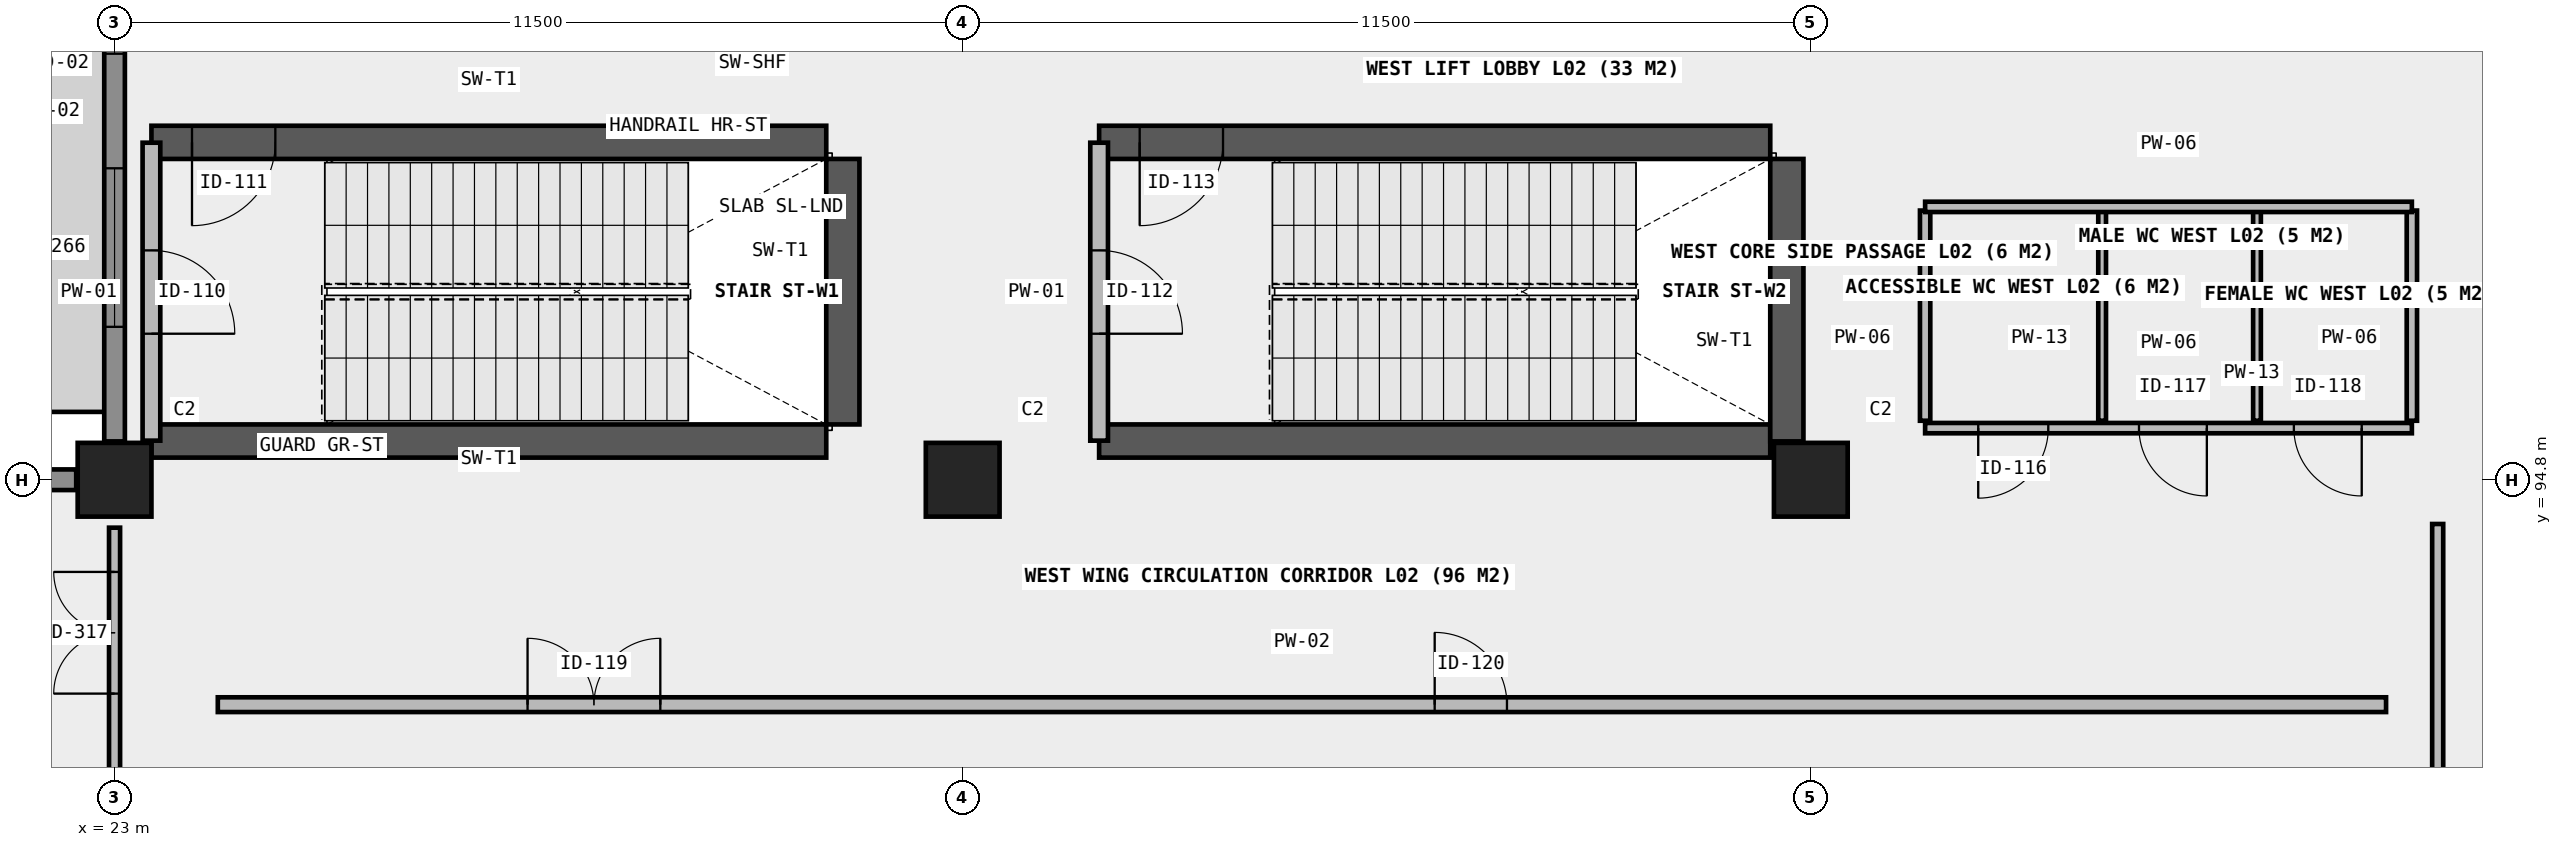
"""IFC4 building model, lengths in metres.
Left out: names, types, materials, properties, quantities, classifications, styles, units other than length and angle.
Written with IfcOpenShell. Run it as: python <this file> out.ifc"""

import sys

from ifc_helpers import new_model, si_unit, direction, frame, frame_2d, origin, origin_2d, place, context, subcontext, project, spatial, rectangle, extrude, element, fill, save


model = new_model("IFC4")
c1 = context("Model", 3, precision=1e-05, world=origin(), true_north=direction((0.0, 1.0)))
c2 = subcontext(c1, "Body", "Model", "MODEL_VIEW")
j1 = project(units=[si_unit("LENGTHUNIT", "METRE"), si_unit("PLANEANGLEUNIT", "RADIAN")], contexts=[c1])
p1 = place(None, origin())
s1 = spatial("IfcSite", under=j1, at=p1, CompositionType="ELEMENT")
p2 = place(p1, origin())
s2 = spatial("IfcBuilding", under=s1, at=p2, CompositionType="ELEMENT")
p3 = place(p2, frame((0.0, 0.0, 8.4)))
s3 = spatial("IfcBuildingStorey", under=s2, at=p3, CompositionType="ELEMENT", Elevation=8.4)
for number, where, z_axis, x_axis in (
    (1, (23.0, 94.8, 0.0), (0.0, 0.0, 1.0), (1.0, 0.0, 0.0)),
    (2, (34.5, 94.8, 0.0), (0.0, 0.0, 1.0), (1.0, 0.0, 0.0)),
    (3, (46.0, 94.8, 0.0), (0.0, 0.0, 1.0), (1.0, 0.0, 0.0)),
):
    element("IfcColumn", number, at=place(p3, frame(where, z_axis=z_axis, x_axis=x_axis)), inside=s3, PredefinedType="COLUMN", context=c2, shape_type="SweptSolid", body=[
        extrude(rectangle(XDim=1.0, YDim=1.0, at=origin_2d()), origin(), (0.0, 0.0, 1.0), 5.4),
    ])
p4 = place(p3, frame((23.5, 95.325, 0.0), z_axis=(0.0, 0.0, 1.0), x_axis=(1.0, 0.0, 0.0)))
e4 = element("IfcWall", 4, at=p4, inside=s3, PredefinedType="SHEAR", context=c2, shape_type="SweptSolid", body=[
    extrude(rectangle(XDim=9.15, YDim=0.45, at=frame_2d((4.575, 0.0))), origin(), (0.0, 0.0, 1.0), 5.4),
])
p5 = place(p3, frame((23.5, 99.375, 0.0), z_axis=(0.0, 0.0, 1.0), x_axis=(1.0, 0.0, 0.0)))
e5 = element("IfcWall", 5, at=p5, inside=s3, PredefinedType="SHEAR", context=c2, shape_type="SweptSolid", body=[
    extrude(rectangle(XDim=9.15, YDim=0.45, at=frame_2d((4.575, 0.0))), origin(), (0.0, 0.0, 1.0), 5.4),
])
p6 = place(p5, frame((0.55, 0.0, 0.0)))
e6 = element("IfcOpeningElement", 6, at=p6, cuts=e5, PredefinedType="OPENING", context=c2, shape_type="SweptSolid", body=[
    extrude(rectangle(XDim=1.13, YDim=2.15, at=frame_2d((0.565, 1.075))), frame((0.0, 0.235, 0.0), z_axis=(0.0, -1.0, 0.0), x_axis=(1.0, 0.0, 0.0)), (0.0, 0.0, 1.0), 0.47),
])
p7 = place(p3, frame((32.875, 95.55, 0.0), z_axis=(0.0, 0.0, 1.0), x_axis=(0.0, 1.0, 0.0)))
e7 = element("IfcWall", 7, at=p7, inside=s3, PredefinedType="SHEAR", context=c2, shape_type="SweptSolid", body=[
    extrude(rectangle(XDim=3.6, YDim=0.45, at=frame_2d((1.8, 0.0))), origin(), (0.0, 0.0, 1.0), 5.4),
])
p8 = place(p3, frame((36.35, 95.325, 0.0), z_axis=(0.0, 0.0, 1.0), x_axis=(1.0, 0.0, 0.0)))
e8 = element("IfcWall", 8, at=p8, inside=s3, PredefinedType="SHEAR", context=c2, shape_type="SweptSolid", body=[
    extrude(rectangle(XDim=9.1, YDim=0.45, at=frame_2d((4.55, 0.0))), origin(), (0.0, 0.0, 1.0), 5.4),
])
p9 = place(p3, frame((36.35, 99.375, 0.0), z_axis=(0.0, 0.0, 1.0), x_axis=(1.0, 0.0, 0.0)))
e9 = element("IfcWall", 9, at=p9, inside=s3, PredefinedType="SHEAR", context=c2, shape_type="SweptSolid", body=[
    extrude(rectangle(XDim=9.1, YDim=0.45, at=frame_2d((4.55, 0.0))), origin(), (0.0, 0.0, 1.0), 5.4),
])
p10 = place(p9, frame((0.55, 0.0, 0.0)))
e10 = element("IfcOpeningElement", 10, at=p10, cuts=e9, PredefinedType="OPENING", context=c2, shape_type="SweptSolid", body=[
    extrude(rectangle(XDim=1.13, YDim=2.15, at=frame_2d((0.565, 1.075))), frame((0.0, 0.235, 0.0), z_axis=(0.0, -1.0, 0.0), x_axis=(1.0, 0.0, 0.0)), (0.0, 0.0, 1.0), 0.47),
])
p11 = place(p3, frame((45.675, 95.32, 0.0), z_axis=(0.0, 0.0, 1.0), x_axis=(0.0, 1.0, 0.0)))
e11 = element("IfcWall", 11, at=p11, inside=s3, PredefinedType="SHEAR", context=c2, shape_type="SweptSolid", body=[
    extrude(rectangle(XDim=3.83, YDim=0.45, at=frame_2d((1.915, 0.0))), origin(), (0.0, 0.0, 1.0), 5.4),
])
p12 = place(p3, frame((23.0, 95.32, 0.0), z_axis=(0.0, 0.0, 1.0), x_axis=(0.0, 1.0, 0.0)))
e12 = element("IfcWall", 12, at=p12, inside=s3, PredefinedType="SOLIDWALL", context=c2, shape_type="SweptSolid", body=[
    extrude(rectangle(XDim=8.96, YDim=0.28, at=frame_2d((4.48, 0.0))), origin(), (0.0, 0.0, 1.0), 4.35),
])
p13 = place(p12, frame((1.553, 0.0, 0.85)))
e13 = element("IfcOpeningElement", 13, at=p13, cuts=e12, PredefinedType="OPENING", context=c2, shape_type="SweptSolid", body=[
    extrude(rectangle(XDim=2.15, YDim=1.95, at=frame_2d((1.075, 0.975))), frame((0.0, 0.15, 0.0), z_axis=(0.0, -1.0, 0.0), x_axis=(1.0, 0.0, 0.0)), (0.0, 0.0, 1.0), 0.3),
])
p14 = place(p12, frame((5.257, 0.0, 0.85)))
e14 = element("IfcOpeningElement", 14, at=p14, cuts=e12, PredefinedType="OPENING", context=c2, shape_type="SweptSolid", body=[
    extrude(rectangle(XDim=2.15, YDim=1.95, at=frame_2d((1.075, 0.975))), frame((0.0, 0.15, 0.0), z_axis=(0.0, -1.0, 0.0), x_axis=(1.0, 0.0, 0.0)), (0.0, 0.0, 1.0), 0.3),
])
p15 = place(p3, frame((12.02, 94.8, 0.0), z_axis=(0.0, 0.0, 1.0), x_axis=(1.0, 0.0, 0.0)))
e15 = element("IfcWall", 15, at=p15, inside=s3, PredefinedType="SOLIDWALL", context=c2, shape_type="SweptSolid", body=[
    extrude(rectangle(XDim=10.46, YDim=0.28, at=frame_2d((5.23, 0.0))), origin(), (0.0, 0.0, 1.0), 4.35),
])
p16 = place(p15, frame((1.002, 0.0, 0.85)))
e16 = element("IfcOpeningElement", 16, at=p16, cuts=e15, PredefinedType="OPENING", context=c2, shape_type="SweptSolid", body=[
    extrude(rectangle(XDim=2.15, YDim=1.95, at=frame_2d((1.075, 0.975))), frame((0.0, 0.15, 0.0), z_axis=(0.0, -1.0, 0.0), x_axis=(1.0, 0.0, 0.0)), (0.0, 0.0, 1.0), 0.3),
])
p17 = place(p15, frame((4.155, 0.0, 0.85)))
e17 = element("IfcOpeningElement", 17, at=p17, cuts=e15, PredefinedType="OPENING", context=c2, shape_type="SweptSolid", body=[
    extrude(rectangle(XDim=2.15, YDim=1.95, at=frame_2d((1.075, 0.975))), frame((0.0, 0.15, 0.0), z_axis=(0.0, -1.0, 0.0), x_axis=(1.0, 0.0, 0.0)), (0.0, 0.0, 1.0), 0.3),
])
p18 = place(p15, frame((7.308, 0.0, 0.85)))
e18 = element("IfcOpeningElement", 18, at=p18, cuts=e15, PredefinedType="OPENING", context=c2, shape_type="SweptSolid", body=[
    extrude(rectangle(XDim=2.15, YDim=1.95, at=frame_2d((1.075, 0.975))), frame((0.0, 0.15, 0.0), z_axis=(0.0, -1.0, 0.0), x_axis=(1.0, 0.0, 0.0)), (0.0, 0.0, 1.0), 0.3),
])
p19 = place(p3, frame((23.5, 95.33, 0.0), z_axis=(0.0, 0.0, 1.0), x_axis=(0.0, 1.0, 0.0)))
e19 = element("IfcWall", 19, at=p19, inside=s3, PredefinedType="SOLIDWALL", context=c2, shape_type="SweptSolid", body=[
    extrude(rectangle(XDim=4.04, YDim=0.24, at=frame_2d((2.02, 0.0))), origin(), (0.0, 0.0, 1.0), 5.12),
])
p20 = place(p19, frame((1.45, 0.0, 0.0)))
e20 = element("IfcOpeningElement", 20, at=p20, cuts=e19, PredefinedType="OPENING", context=c2, shape_type="SweptSolid", body=[
    extrude(rectangle(XDim=1.13, YDim=2.15, at=frame_2d((0.565, 1.075))), frame((0.0, 0.13, 0.0), z_axis=(0.0, -1.0, 0.0), x_axis=(1.0, 0.0, 0.0)), (0.0, 0.0, 1.0), 0.26),
])
p21 = place(p3, frame((36.35, 95.33, 0.0), z_axis=(0.0, 0.0, 1.0), x_axis=(0.0, 1.0, 0.0)))
e21 = element("IfcWall", 21, at=p21, inside=s3, PredefinedType="SOLIDWALL", context=c2, shape_type="SweptSolid", body=[
    extrude(rectangle(XDim=4.04, YDim=0.24, at=frame_2d((2.02, 0.0))), origin(), (0.0, 0.0, 1.0), 5.12),
])
p22 = place(p21, frame((1.45, 0.0, 0.0)))
e22 = element("IfcOpeningElement", 22, at=p22, cuts=e21, PredefinedType="OPENING", context=c2, shape_type="SweptSolid", body=[
    extrude(rectangle(XDim=1.13, YDim=2.15, at=frame_2d((0.565, 1.075))), frame((0.0, 0.13, 0.0), z_axis=(0.0, -1.0, 0.0), x_axis=(1.0, 0.0, 0.0)), (0.0, 0.0, 1.0), 0.26),
])
p23 = place(p3, frame((47.55, 95.5, 0.0), z_axis=(0.0, 0.0, 1.0), x_axis=(1.0, 0.0, 0.0)))
e23 = element("IfcWall", 23, at=p23, inside=s3, PredefinedType="PLUMBINGWALL", context=c2, shape_type="SweptSolid", body=[
    extrude(rectangle(XDim=6.6, YDim=0.14, at=frame_2d((3.3, 0.0))), origin(), (0.0, 0.0, 1.0), 5.12),
])
p24 = place(p23, frame((0.72, 0.0, 0.0)))
e24 = element("IfcOpeningElement", 24, at=p24, cuts=e23, PredefinedType="OPENING", context=c2, shape_type="SweptSolid", body=[
    extrude(rectangle(XDim=0.95, YDim=2.1, at=frame_2d((0.475, 1.05))), frame((0.0, 0.08, 0.0), z_axis=(0.0, -1.0, 0.0), x_axis=(1.0, 0.0, 0.0)), (0.0, 0.0, 1.0), 0.16),
])
p25 = place(p23, frame((2.9, 0.0, 0.0)))
e25 = element("IfcOpeningElement", 25, at=p25, cuts=e23, PredefinedType="OPENING", context=c2, shape_type="SweptSolid", body=[
    extrude(rectangle(XDim=0.92, YDim=2.1, at=frame_2d((0.46, 1.05))), frame((0.0, 0.08, 0.0), z_axis=(0.0, -1.0, 0.0), x_axis=(1.0, 0.0, 0.0)), (0.0, 0.0, 1.0), 0.16),
])
p26 = place(p23, frame((5.0, 0.0, 0.0)))
e26 = element("IfcOpeningElement", 26, at=p26, cuts=e23, PredefinedType="OPENING", context=c2, shape_type="SweptSolid", body=[
    extrude(rectangle(XDim=0.92, YDim=2.1, at=frame_2d((0.46, 1.05))), frame((0.0, 0.08, 0.0), z_axis=(0.0, -1.0, 0.0), x_axis=(1.0, 0.0, 0.0)), (0.0, 0.0, 1.0), 0.16),
])
p27 = place(p3, frame((47.55, 95.6, 0.0), z_axis=(0.0, 0.0, 1.0), x_axis=(0.0, 1.0, 0.0)))
e27 = element("IfcWall", 27, at=p27, inside=s3, PredefinedType="PLUMBINGWALL", context=c2, shape_type="SweptSolid", body=[
    extrude(rectangle(XDim=2.85, YDim=0.14, at=frame_2d((1.425, 0.0))), origin(), (0.0, 0.0, 1.0), 5.12),
])
p28 = place(p3, frame((49.95, 95.6, 0.0), z_axis=(0.0, 0.0, 1.0), x_axis=(0.0, 1.0, 0.0)))
e28 = element("IfcWall", 28, at=p28, inside=s3, PredefinedType="PARTITIONING", context=c2, shape_type="SweptSolid", body=[
    extrude(rectangle(XDim=2.85, YDim=0.105, at=frame_2d((1.425, 0.0))), origin(), (0.0, 0.0, 1.0), 4.6),
])
p29 = place(p3, frame((52.05, 95.6, 0.0), z_axis=(0.0, 0.0, 1.0), x_axis=(0.0, 1.0, 0.0)))
e29 = element("IfcWall", 29, at=p29, inside=s3, PredefinedType="PARTITIONING", context=c2, shape_type="SweptSolid", body=[
    extrude(rectangle(XDim=2.85, YDim=0.105, at=frame_2d((1.425, 0.0))), origin(), (0.0, 0.0, 1.0), 5.12),
])
p30 = place(p3, frame((54.15, 95.6, 0.0), z_axis=(0.0, 0.0, 1.0), x_axis=(0.0, 1.0, 0.0)))
e30 = element("IfcWall", 30, at=p30, inside=s3, PredefinedType="PLUMBINGWALL", context=c2, shape_type="SweptSolid", body=[
    extrude(rectangle(XDim=2.85, YDim=0.14, at=frame_2d((1.425, 0.0))), origin(), (0.0, 0.0, 1.0), 5.12),
])
p31 = place(p3, frame((47.55, 98.5, 0.0), z_axis=(0.0, 0.0, 1.0), x_axis=(1.0, 0.0, 0.0)))
e31 = element("IfcWall", 31, at=p31, inside=s3, PredefinedType="PLUMBINGWALL", context=c2, shape_type="SweptSolid", body=[
    extrude(rectangle(XDim=6.6, YDim=0.14, at=frame_2d((3.3, 0.0))), origin(), (0.0, 0.0, 1.0), 5.12),
])
p32 = place(p3, frame((24.4, 91.75, 0.0), z_axis=(0.0, 0.0, 1.0), x_axis=(1.0, 0.0, 0.0)))
e32 = element("IfcWall", 32, at=p32, inside=s3, PredefinedType="PARTITIONING", context=c2, shape_type="SweptSolid", body=[
    extrude(rectangle(XDim=29.4, YDim=0.2, at=frame_2d((14.7, 0.0))), origin(), (0.0, 0.0, 1.0), 5.12),
])
p33 = place(p32, frame((4.2, 0.0, 0.0)))
e33 = element("IfcOpeningElement", 33, at=p33, cuts=e32, PredefinedType="OPENING", context=c2, shape_type="SweptSolid", body=[
    extrude(rectangle(XDim=1.8, YDim=2.2, at=frame_2d((0.9, 1.1))), frame((0.0, 0.11, 0.0), z_axis=(0.0, -1.0, 0.0), x_axis=(1.0, 0.0, 0.0)), (0.0, 0.0, 1.0), 0.22),
])
p34 = place(p32, frame((16.5, 0.0, 0.0)))
e34 = element("IfcOpeningElement", 34, at=p34, cuts=e32, PredefinedType="OPENING", context=c2, shape_type="SweptSolid", body=[
    extrude(rectangle(XDim=0.98, YDim=2.15, at=frame_2d((0.49, 1.075))), frame((0.0, 0.11, 0.0), z_axis=(0.0, -1.0, 0.0), x_axis=(1.0, 0.0, 0.0)), (0.0, 0.0, 1.0), 0.22),
])
p35 = place(p3, frame((54.5, 86.4, 0.0), z_axis=(0.0, 0.0, 1.0), x_axis=(0.0, 1.0, 0.0)))
e35 = element("IfcWall", 35, at=p35, inside=s3, PredefinedType="PARTITIONING", context=c2, shape_type="SweptSolid", body=[
    extrude(rectangle(XDim=7.8, YDim=0.15, at=frame_2d((3.9, 0.0))), origin(), (0.0, 0.0, 1.0), 5.12),
])
p36 = place(p35, frame((2.8, 0.0, 0.0)))
e36 = element("IfcOpeningElement", 36, at=p36, cuts=e35, PredefinedType="OPENING", context=c2, shape_type="SweptSolid", body=[
    extrude(rectangle(XDim=1.65, YDim=2.2, at=frame_2d((0.825, 1.1))), frame((0.0, 0.085, 0.0), z_axis=(0.0, -1.0, 0.0), x_axis=(1.0, 0.0, 0.0)), (0.0, 0.0, 1.0), 0.17),
])
p37 = place(p3, frame((23.0, 86.45, 0.0), z_axis=(0.0, 0.0, 1.0), x_axis=(0.0, 1.0, 0.0)))
e37 = element("IfcWall", 37, at=p37, inside=s3, PredefinedType="PARTITIONING", context=c2, shape_type="SweptSolid", body=[
    extrude(rectangle(XDim=7.7, YDim=0.15, at=frame_2d((3.85, 0.0))), origin(), (0.0, 0.0, 1.0), 4.35),
])
p38 = place(p37, frame((5.45, 0.0, 0.0)))
e38 = element("IfcOpeningElement", 38, at=p38, cuts=e37, PredefinedType="OPENING", context=c2, shape_type="SweptSolid", body=[
    extrude(rectangle(XDim=1.65, YDim=2.2, at=frame_2d((0.825, 1.1))), frame((0.0, 0.085, 0.0), z_axis=(0.0, -1.0, 0.0), x_axis=(1.0, 0.0, 0.0)), (0.0, 0.0, 1.0), 0.17),
])
p39 = place(p13, origin())
e39 = element("IfcWindow", 39, at=p39, inside=s3, PartitioningType="SINGLE_PANEL", PredefinedType="WINDOW", context=c2, shape_type="SweptSolid", body=[
    extrude(rectangle(XDim=2.15, YDim=1.95, at=frame_2d((1.075, 0.975))), frame((0.0, 0.03, 0.0), z_axis=(0.0, -1.0, 0.0), x_axis=(1.0, 0.0, 0.0)), (0.0, 0.0, 1.0), 0.06),
])
fill(e13, e39)
p40 = place(p14, origin())
e40 = element("IfcWindow", 40, at=p40, inside=s3, PartitioningType="SINGLE_PANEL", PredefinedType="WINDOW", context=c2, shape_type="SweptSolid", body=[
    extrude(rectangle(XDim=2.15, YDim=1.95, at=frame_2d((1.075, 0.975))), frame((0.0, 0.03, 0.0), z_axis=(0.0, -1.0, 0.0), x_axis=(1.0, 0.0, 0.0)), (0.0, 0.0, 1.0), 0.06),
])
fill(e14, e40)
p41 = place(p20, frame((0.565, 0.0, 0.0), z_axis=(0.0, 0.0, 1.0), x_axis=(-1.0, 0.0, 0.0)))
e41 = element("IfcDoor", 41, at=p41, inside=s3, OperationType="SINGLE_SWING_LEFT", PredefinedType="DOOR", context=c2, shape_type="SweptSolid", body=[
    extrude(rectangle(XDim=1.13, YDim=2.15, at=frame_2d((0.0, 1.075))), frame((0.0, 0.025, 0.0), z_axis=(0.0, -1.0, 0.0), x_axis=(1.0, 0.0, 0.0)), (0.0, 0.0, 1.0), 0.05),
])
fill(e20, e41)
p42 = place(p6, frame((0.565, 0.0, 0.0), z_axis=(0.0, 0.0, 1.0), x_axis=(-1.0, 0.0, 0.0)))
e42 = element("IfcDoor", 42, at=p42, inside=s3, OperationType="SINGLE_SWING_LEFT", PredefinedType="DOOR", context=c2, shape_type="SweptSolid", body=[
    extrude(rectangle(XDim=1.13, YDim=2.15, at=frame_2d((0.0, 1.075))), frame((0.0, 0.025, 0.0), z_axis=(0.0, -1.0, 0.0), x_axis=(1.0, 0.0, 0.0)), (0.0, 0.0, 1.0), 0.05),
])
fill(e6, e42)
p43 = place(p22, frame((0.565, 0.0, 0.0), z_axis=(0.0, 0.0, 1.0), x_axis=(-1.0, 0.0, 0.0)))
e43 = element("IfcDoor", 43, at=p43, inside=s3, OperationType="SINGLE_SWING_LEFT", PredefinedType="DOOR", context=c2, shape_type="SweptSolid", body=[
    extrude(rectangle(XDim=1.13, YDim=2.15, at=frame_2d((0.0, 1.075))), frame((0.0, 0.025, 0.0), z_axis=(0.0, -1.0, 0.0), x_axis=(1.0, 0.0, 0.0)), (0.0, 0.0, 1.0), 0.05),
])
fill(e22, e43)
p44 = place(p10, frame((0.565, 0.0, 0.0), z_axis=(0.0, 0.0, 1.0), x_axis=(-1.0, 0.0, 0.0)))
e44 = element("IfcDoor", 44, at=p44, inside=s3, OperationType="SINGLE_SWING_LEFT", PredefinedType="DOOR", context=c2, shape_type="SweptSolid", body=[
    extrude(rectangle(XDim=1.13, YDim=2.15, at=frame_2d((0.0, 1.075))), frame((0.0, 0.025, 0.0), z_axis=(0.0, -1.0, 0.0), x_axis=(1.0, 0.0, 0.0)), (0.0, 0.0, 1.0), 0.05),
])
fill(e10, e44)
p45 = place(p24, frame((0.475, 0.0, 0.0), z_axis=(0.0, 0.0, 1.0), x_axis=(-1.0, 0.0, 0.0)))
e45 = element("IfcDoor", 45, at=p45, inside=s3, OperationType="SINGLE_SWING_LEFT", PredefinedType="DOOR", context=c2, shape_type="SweptSolid", body=[
    extrude(rectangle(XDim=0.95, YDim=2.1, at=frame_2d((0.0, 1.05))), frame((0.0, 0.025, 0.0), z_axis=(0.0, -1.0, 0.0), x_axis=(1.0, 0.0, 0.0)), (0.0, 0.0, 1.0), 0.05),
])
fill(e24, e45)
p46 = place(p25, origin())
e46 = element("IfcDoor", 46, at=p46, inside=s3, OperationType="SINGLE_SWING_RIGHT", PredefinedType="DOOR", context=c2, shape_type="SweptSolid", body=[
    extrude(rectangle(XDim=0.92, YDim=2.1, at=frame_2d((0.46, 1.05))), frame((0.0, 0.025, 0.0), z_axis=(0.0, -1.0, 0.0), x_axis=(1.0, 0.0, 0.0)), (0.0, 0.0, 1.0), 0.05),
])
fill(e25, e46)
p47 = place(p26, origin())
e47 = element("IfcDoor", 47, at=p47, inside=s3, OperationType="SINGLE_SWING_RIGHT", PredefinedType="DOOR", context=c2, shape_type="SweptSolid", body=[
    extrude(rectangle(XDim=0.92, YDim=2.1, at=frame_2d((0.46, 1.05))), frame((0.0, 0.025, 0.0), z_axis=(0.0, -1.0, 0.0), x_axis=(1.0, 0.0, 0.0)), (0.0, 0.0, 1.0), 0.05),
])
fill(e26, e47)
p48 = place(p33, origin())
e48 = element("IfcDoor", 48, at=p48, inside=s3, OperationType="DOUBLE_DOOR_SINGLE_SWING", PredefinedType="DOOR", context=c2, shape_type="SweptSolid", body=[
    extrude(rectangle(XDim=1.8, YDim=2.2, at=frame_2d((0.9, 1.1))), frame((0.0, 0.025, 0.0), z_axis=(0.0, -1.0, 0.0), x_axis=(1.0, 0.0, 0.0)), (0.0, 0.0, 1.0), 0.05),
])
fill(e33, e48)
p49 = place(p34, origin())
e49 = element("IfcDoor", 49, at=p49, inside=s3, OperationType="SINGLE_SWING_LEFT", PredefinedType="DOOR", context=c2, shape_type="SweptSolid", body=[
    extrude(rectangle(XDim=0.98, YDim=2.15, at=frame_2d((0.49, 1.075))), frame((0.0, 0.025, 0.0), z_axis=(0.0, -1.0, 0.0), x_axis=(1.0, 0.0, 0.0)), (0.0, 0.0, 1.0), 0.05),
])
fill(e34, e49)
p50 = place(p38, origin())
e50 = element("IfcDoor", 50, at=p50, inside=s3, OperationType="DOUBLE_DOOR_SINGLE_SWING", PredefinedType="DOOR", context=c2, shape_type="SweptSolid", body=[
    extrude(rectangle(XDim=1.65, YDim=2.2, at=frame_2d((0.825, 1.1))), frame((0.0, 0.025, 0.0), z_axis=(0.0, -1.0, 0.0), x_axis=(1.0, 0.0, 0.0)), (0.0, 0.0, 1.0), 0.05),
])
fill(e38, e50)
save(model, sys.argv[1])
